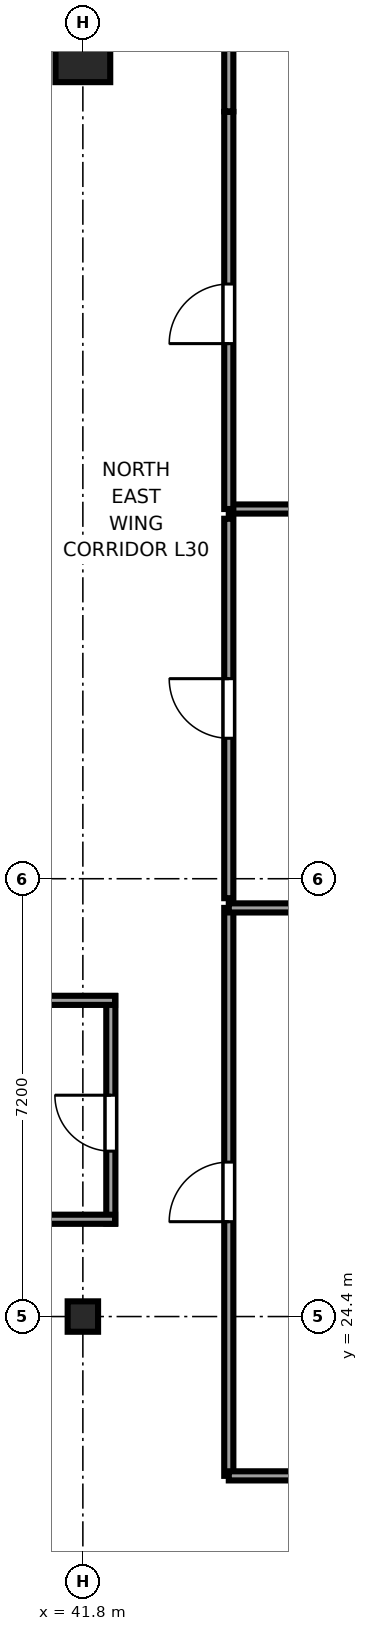
"""IFC4 building model, lengths in metres.
Left out: names, types, materials, properties, quantities, classifications, styles, units other than length and angle.
Written with IfcOpenShell. Run it as: python <this file> out.ifc"""

import sys

from ifc_helpers import new_model, si_unit, direction, frame, frame_2d, origin, origin_2d, place, context, subcontext, project, spatial, rectangle, i_section, extrude, source, transform, mapped, element, fill, save


model = new_model("IFC4")
c1 = context("Model", 3, precision=1e-05, world=origin(), true_north=direction((0.0, 1.0)))
c2 = subcontext(c1, "Body", "Model", "MODEL_VIEW")
j1 = project(units=[si_unit("LENGTHUNIT", "METRE"), si_unit("PLANEANGLEUNIT", "RADIAN")], contexts=[c1])
p1 = place(None, origin())
s1 = spatial("IfcSite", under=j1, at=p1, CompositionType="ELEMENT")
p2 = place(p1, origin())
s2 = spatial("IfcBuilding", under=s1, at=p2, CompositionType="ELEMENT")
p3 = place(p2, frame((0.0, 0.0, 118.65)))
s3 = spatial("IfcBuildingStorey", under=s2, at=p3, CompositionType="ELEMENT", Elevation=118.65)
m1 = source(origin(), c2, "Body", "SweptSolid", [
    extrude(i_section(OverallWidth=0.5, OverallDepth=0.5, WebThickness=0.022, FlangeThickness=0.034, at=origin_2d()), origin(), (0.0, 0.0, 1.0), 3.55),
])
p4 = place(p3, frame((41.8, 24.4, 0.0), z_axis=(0.0, 0.0, 1.0), x_axis=(1.0, 0.0, 0.0)))
e1 = element("IfcColumn", 1, at=p4, inside=s3, PredefinedType="COLUMN", context=c2, shape_type="MappedRepresentation", body=[
    mapped(m1, transform((0.0, 0.0, 0.0), x_axis=(1.0, 0.0, 0.0), y_axis=(0.0, 1.0, 0.0), z_axis=(0.0, 0.0, 1.0), scale=1.0)),
])
m2 = source(origin(), c2, "Body", "SweptSolid", [
    extrude(rectangle(XDim=0.9, YDim=0.9, at=origin_2d()), origin(), (0.0, 0.0, 1.0), 3.55),
])
p5 = place(p3, frame((41.8, 45.15, 0.0), z_axis=(0.0, 0.0, 1.0), x_axis=(1.0, 0.0, 0.0)))
e2 = element("IfcColumn", 2, at=p5, inside=s3, PredefinedType="COLUMN", context=c2, shape_type="MappedRepresentation", body=[
    mapped(m2, transform((0.0, 0.0, 0.0), x_axis=(1.0, 0.0, 0.0), y_axis=(0.0, 1.0, 0.0), z_axis=(0.0, 0.0, 1.0), scale=1.0)),
])
p6 = place(p3, frame((44.2, 37.68, 0.0), z_axis=(0.0, 0.0, 1.0), x_axis=(1.0, 0.0, 0.0)))
e3 = element("IfcWall", 3, at=p6, inside=s3, PredefinedType="PARTITIONING", context=c2, shape_type="SweptSolid", body=[
    extrude(rectangle(XDim=12.395, YDim=0.15, at=frame_2d((6.198, 0.0))), origin(), (0.0, 0.0, 1.0), 3.37),
])
p7 = place(p3, frame((44.2, 21.78, 0.0), z_axis=(0.0, 0.0, 1.0), x_axis=(0.0, 1.0, 0.0)))
e4 = element("IfcWall", 4, at=p7, inside=s3, PredefinedType="PARTITIONING", context=c2, shape_type="SweptSolid", body=[
    extrude(rectangle(XDim=9.34, YDim=0.15, at=frame_2d((4.67, 0.0))), origin(), (0.0, 0.0, 1.0), 3.37),
])
p8 = place(p7, frame((4.18, 0.0, 0.0)))
e5 = element("IfcOpeningElement", 5, at=p8, cuts=e4, PredefinedType="OPENING", context=c2, shape_type="SweptSolid", body=[
    extrude(rectangle(XDim=0.98, YDim=2.12, at=frame_2d((0.49, 1.06))), frame((0.0, 0.085, 0.0), z_axis=(0.0, -1.0, 0.0), x_axis=(1.0, 0.0, 0.0)), (0.0, 0.0, 1.0), 0.17),
])
p9 = place(p3, frame((44.2, 21.78, 0.0), z_axis=(0.0, 0.0, 1.0), x_axis=(1.0, 0.0, 0.0)))
e6 = element("IfcWall", 6, at=p9, inside=s3, PredefinedType="PARTITIONING", context=c2, shape_type="SweptSolid", body=[
    extrude(rectangle(XDim=12.395, YDim=0.15, at=frame_2d((6.198, 0.0))), origin(), (0.0, 0.0, 1.0), 3.37),
])
p10 = place(p3, frame((44.2, 31.12, 0.0), z_axis=(0.0, 0.0, 1.0), x_axis=(1.0, 0.0, 0.0)))
e7 = element("IfcWall", 7, at=p10, inside=s3, PredefinedType="PARTITIONING", context=c2, shape_type="SweptSolid", body=[
    extrude(rectangle(XDim=10.03, YDim=0.15, at=frame_2d((5.015, 0.0))), origin(), (0.0, 0.0, 1.0), 3.37),
])
p11 = place(p3, frame((44.2, 31.28, 0.0), z_axis=(0.0, 0.0, 1.0), x_axis=(0.0, 1.0, 0.0)))
e8 = element("IfcWall", 8, at=p11, inside=s3, PredefinedType="PARTITIONING", context=c2, shape_type="SweptSolid", body=[
    extrude(rectangle(XDim=6.24, YDim=0.15, at=frame_2d((3.12, 0.0))), origin(), (0.0, 0.0, 1.0), 3.37),
])
p12 = place(p11, frame((2.63, 0.0, 0.0)))
e9 = element("IfcOpeningElement", 9, at=p12, cuts=e8, PredefinedType="OPENING", context=c2, shape_type="SweptSolid", body=[
    extrude(rectangle(XDim=0.98, YDim=2.12, at=frame_2d((0.49, 1.06))), frame((0.0, 0.085, 0.0), z_axis=(0.0, -1.0, 0.0), x_axis=(1.0, 0.0, 0.0)), (0.0, 0.0, 1.0), 0.17),
])
p13 = place(p3, frame((44.2, 37.68, 0.0), z_axis=(0.0, 0.0, 1.0), x_axis=(0.0, 1.0, 0.0)))
e10 = element("IfcWall", 10, at=p13, inside=s3, PredefinedType="PARTITIONING", context=c2, shape_type="SweptSolid", body=[
    extrude(rectangle(XDim=6.53, YDim=0.15, at=frame_2d((3.265, 0.0))), origin(), (0.0, 0.0, 1.0), 3.37),
])
p14 = place(p13, frame((2.72, 0.0, 0.0)))
e11 = element("IfcOpeningElement", 11, at=p14, cuts=e10, PredefinedType="OPENING", context=c2, shape_type="SweptSolid", body=[
    extrude(rectangle(XDim=0.98, YDim=2.12, at=frame_2d((0.49, 1.06))), frame((0.0, 0.085, 0.0), z_axis=(0.0, -1.0, 0.0), x_axis=(1.0, 0.0, 0.0)), (0.0, 0.0, 1.0), 0.17),
])
p15 = place(p3, frame((44.2, 44.22, 0.0), z_axis=(0.0, 0.0, 1.0), x_axis=(0.0, 1.0, 0.0)))
e12 = element("IfcWall", 12, at=p15, inside=s3, PredefinedType="PARTITIONING", context=c2, shape_type="SweptSolid", body=[
    extrude(rectangle(XDim=1.375, YDim=0.15, at=frame_2d((0.688, 0.0))), origin(), (0.0, 0.0, 1.0), 3.37),
])
p16 = place(p3, frame((42.26, 25.93, 0.0), z_axis=(0.0, 0.0, 1.0), x_axis=(0.0, 1.0, 0.0)))
e13 = element("IfcWall", 13, at=p16, inside=s3, PredefinedType="PARTITIONING", context=c2, shape_type="SweptSolid", body=[
    extrude(rectangle(XDim=3.74, YDim=0.15, at=frame_2d((1.87, 0.0))), origin(), (0.0, 0.0, 1.0), 3.37),
])
p17 = place(p16, frame((1.19, 0.0, 0.0)))
e14 = element("IfcOpeningElement", 14, at=p17, cuts=e13, PredefinedType="OPENING", context=c2, shape_type="SweptSolid", body=[
    extrude(rectangle(XDim=0.92, YDim=2.01, at=frame_2d((0.46, 1.005))), frame((0.0, 0.085, 0.0), z_axis=(0.0, -1.0, 0.0), x_axis=(1.0, 0.0, 0.0)), (0.0, 0.0, 1.0), 0.17),
])
for number, where, z_axis, x_axis in (
    (15, (37.93, 26.0, 0.0), (0.0, 0.0, 1.0), (1.0, 0.0, 0.0)),
    (16, (37.93, 29.6, 0.0), (0.0, 0.0, 1.0), (1.0, 0.0, 0.0)),
):
    element("IfcWall", number, at=place(p3, frame(where, z_axis=z_axis, x_axis=x_axis)), inside=s3, PredefinedType="PARTITIONING", context=c2, shape_type="SweptSolid", body=[
        extrude(rectangle(XDim=4.4, YDim=0.15, at=frame_2d((2.2, 0.0))), origin(), (0.0, 0.0, 1.0), 3.37),
    ])
m3 = source(origin(), c2, "Body", "SweptSolid", [
    extrude(rectangle(XDim=0.98, YDim=2.12, at=frame_2d((0.49, 1.06))), frame((0.0, 0.025, 0.0), z_axis=(0.0, -1.0, 0.0), x_axis=(1.0, 0.0, 0.0)), (0.0, 0.0, 1.0), 0.05),
])
p18 = place(p8, origin())
e17 = element("IfcDoor", 17, at=p18, inside=s3, OperationType="SINGLE_SWING_LEFT", PredefinedType="DOOR", context=c2, shape_type="MappedRepresentation", body=[
    mapped(m3, transform((0.0, 0.0, 0.0), x_axis=(1.0, 0.0, 0.0), y_axis=(0.0, 1.0, 0.0), z_axis=(0.0, 0.0, 1.0), scale=1.0)),
])
fill(e5, e17)
p19 = place(p12, origin())
e18 = element("IfcDoor", 18, at=p19, inside=s3, OperationType="SINGLE_SWING_RIGHT", PredefinedType="DOOR", context=c2, shape_type="MappedRepresentation", body=[
    mapped(m3, transform((0.0, 0.0, 0.0), x_axis=(1.0, 0.0, 0.0), y_axis=(0.0, 1.0, 0.0), z_axis=(0.0, 0.0, 1.0), scale=1.0)),
])
fill(e9, e18)
p20 = place(p14, origin())
e19 = element("IfcDoor", 19, at=p20, inside=s3, OperationType="SINGLE_SWING_LEFT", PredefinedType="DOOR", context=c2, shape_type="MappedRepresentation", body=[
    mapped(m3, transform((0.0, 0.0, 0.0), x_axis=(1.0, 0.0, 0.0), y_axis=(0.0, 1.0, 0.0), z_axis=(0.0, 0.0, 1.0), scale=1.0)),
])
fill(e11, e19)
m4 = source(origin(), c2, "Body", "SweptSolid", [
    extrude(rectangle(XDim=0.92, YDim=2.01, at=frame_2d((0.46, 1.005))), frame((0.0, 0.025, 0.0), z_axis=(0.0, -1.0, 0.0), x_axis=(1.0, 0.0, 0.0)), (0.0, 0.0, 1.0), 0.05),
])
p21 = place(p17, origin())
e20 = element("IfcDoor", 20, at=p21, inside=s3, OperationType="SINGLE_SWING_RIGHT", PredefinedType="DOOR", context=c2, shape_type="MappedRepresentation", body=[
    mapped(m4, transform((0.0, 0.0, 0.0), x_axis=(1.0, 0.0, 0.0), y_axis=(0.0, 1.0, 0.0), z_axis=(0.0, 0.0, 1.0), scale=1.0)),
])
fill(e14, e20)
save(model, sys.argv[1])
